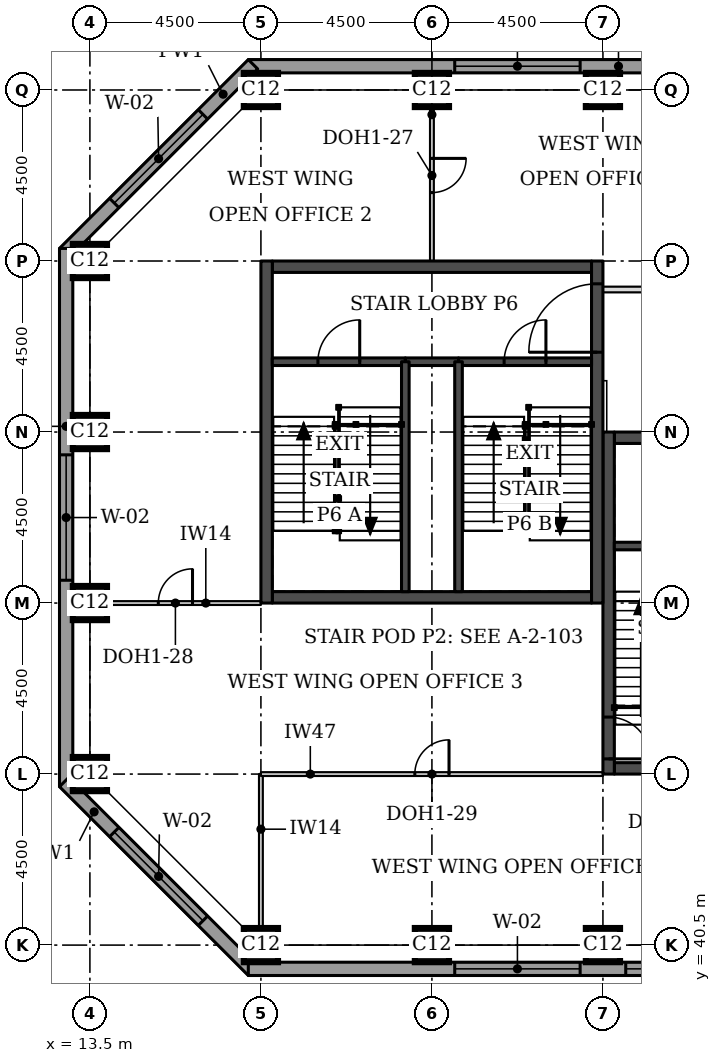
"""IFC4 building model, lengths in metres.
Left out: names, types, materials, properties, quantities, classifications, styles, units other than length and angle.
Written with IfcOpenShell. Run it as: python <this file> out.ifc"""

import sys

from ifc_helpers import new_model, si_unit, direction, frame, frame_2d, origin, origin_2d, place, context, subcontext, project, spatial, rectangle, extrude, element, fill, save


model = new_model("IFC4")
c1 = context("Model", 3, precision=1e-05, world=origin(), true_north=direction((0.0, 1.0)))
c2 = subcontext(c1, "Body", "Model", "MODEL_VIEW")
j1 = project(units=[si_unit("LENGTHUNIT", "METRE"), si_unit("PLANEANGLEUNIT", "RADIAN")], contexts=[c1])
p1 = place(None, origin())
s1 = spatial("IfcSite", under=j1, at=p1, CompositionType="ELEMENT")
p2 = place(p1, origin())
s2 = spatial("IfcBuilding", under=s1, at=p2, CompositionType="ELEMENT")
p3 = place(p2, frame((0.0, 0.0, 147.7)))
s3 = spatial("IfcBuildingStorey", under=s2, at=p3, CompositionType="ELEMENT", Elevation=147.7)
for number, where, z_axis, x_axis in (
    (1, (18.0, 40.5, 0.0), (0.0, 0.0, 1.0), (1.0, 0.0, 0.0)),
    (2, (22.5, 40.5, 0.0), (0.0, 0.0, 1.0), (1.0, 0.0, 0.0)),
    (3, (27.0, 40.5, 0.0), (0.0, 0.0, 1.0), (1.0, 0.0, 0.0)),
    (4, (13.5, 45.0, 0.0), (0.0, 0.0, 1.0), (1.0, 0.0, 0.0)),
    (5, (13.5, 49.5, 0.0), (0.0, 0.0, 1.0), (1.0, 0.0, 0.0)),
    (6, (13.5, 54.0, 0.0), (0.0, 0.0, 1.0), (1.0, 0.0, 0.0)),
    (7, (13.5, 58.5, 0.0), (0.0, 0.0, 1.0), (1.0, 0.0, 0.0)),
    (8, (18.0, 63.0, 0.0), (0.0, 0.0, 1.0), (1.0, 0.0, 0.0)),
    (9, (22.5, 63.0, 0.0), (0.0, 0.0, 1.0), (1.0, 0.0, 0.0)),
    (10, (27.0, 63.0, 0.0), (0.0, 0.0, 1.0), (1.0, 0.0, 0.0)),
):
    element("IfcColumn", number, at=place(p3, frame(where, z_axis=z_axis, x_axis=x_axis)), inside=s3, PredefinedType="COLUMN", context=c2, shape_type="SweptSolid", body=[
        extrude(rectangle(XDim=0.9, YDim=0.9, at=origin_2d()), origin(), (0.0, 0.0, 1.0), 3.7),
    ])
p4 = place(p3, frame((27.3, 45.15, 0.0), z_axis=(0.0, 0.0, 1.0), x_axis=(1.0, 0.0, 0.0)))
e11 = element("IfcWall", 11, at=p4, inside=s3, PredefinedType="SHEAR", context=c2, shape_type="SweptSolid", body=[
    extrude(rectangle(XDim=8.4, YDim=0.3, at=frame_2d((4.2, 0.0))), origin(), (0.0, 0.0, 1.0), 3.7),
])
p5 = place(p4, frame((5.2, 0.0, 0.0)))
e12 = element("IfcOpeningElement", 12, at=p5, cuts=e11, PredefinedType="OPENING", context=c2, shape_type="SweptSolid", body=[
    extrude(rectangle(XDim=1.0, YDim=2.1, at=frame_2d((0.5, 1.05))), frame((0.0, 0.16, 0.0), z_axis=(0.0, -1.0, 0.0), x_axis=(1.0, 0.0, 0.0)), (0.0, 0.0, 1.0), 0.32),
])
p6 = place(p3, frame((27.3, 53.85, 0.0), z_axis=(0.0, 0.0, 1.0), x_axis=(1.0, 0.0, 0.0)))
e13 = element("IfcWall", 13, at=p6, inside=s3, PredefinedType="SHEAR", context=c2, shape_type="SweptSolid", body=[
    extrude(rectangle(XDim=8.4, YDim=0.3, at=frame_2d((4.2, 0.0))), origin(), (0.0, 0.0, 1.0), 3.7),
])
p7 = place(p6, frame((6.4, 0.0, 0.0)))
e14 = element("IfcOpeningElement", 14, at=p7, cuts=e13, PredefinedType="OPENING", context=c2, shape_type="SweptSolid", body=[
    extrude(rectangle(XDim=1.1, YDim=2.1, at=frame_2d((0.55, 1.05))), frame((0.0, 0.16, 0.0), z_axis=(0.0, -1.0, 0.0), x_axis=(1.0, 0.0, 0.0)), (0.0, 0.0, 1.0), 0.32),
])
p8 = place(p3, frame((27.15, 45.0, 0.0), z_axis=(0.0, 0.0, 1.0), x_axis=(0.0, 1.0, 0.0)))
e15 = element("IfcWall", 15, at=p8, inside=s3, PredefinedType="SHEAR", context=c2, shape_type="SweptSolid", body=[
    extrude(rectangle(XDim=9.0, YDim=0.3, at=frame_2d((4.5, 0.0))), origin(), (0.0, 0.0, 1.0), 3.7),
])
p9 = place(p8, frame((0.4, 0.0, 0.0)))
e16 = element("IfcOpeningElement", 16, at=p9, cuts=e15, PredefinedType="OPENING", context=c2, shape_type="SweptSolid", body=[
    extrude(rectangle(XDim=1.1, YDim=2.1, at=frame_2d((0.55, 1.05))), frame((0.0, 0.16, 0.0), z_axis=(0.0, -1.0, 0.0), x_axis=(1.0, 0.0, 0.0)), (0.0, 0.0, 1.0), 0.32),
])
for number, where, z_axis, x_axis in (
    (17, (18.3, 49.65, 0.0), (0.0, 0.0, 1.0), (1.0, 0.0, 0.0)),
    (18, (18.3, 58.35, 0.0), (0.0, 0.0, 1.0), (1.0, 0.0, 0.0)),
):
    element("IfcWall", number, at=place(p3, frame(where, z_axis=z_axis, x_axis=x_axis)), inside=s3, PredefinedType="SHEAR", context=c2, shape_type="SweptSolid", body=[
        extrude(rectangle(XDim=8.4, YDim=0.3, at=frame_2d((4.2, 0.0))), origin(), (0.0, 0.0, 1.0), 3.7),
    ])
p10 = place(p3, frame((18.15, 49.5, 0.0), z_axis=(0.0, 0.0, 1.0), x_axis=(0.0, 1.0, 0.0)))
e19 = element("IfcWall", 19, at=p10, inside=s3, PredefinedType="SHEAR", context=c2, shape_type="SweptSolid", body=[
    extrude(rectangle(XDim=9.0, YDim=0.3, at=frame_2d((4.5, 0.0))), origin(), (0.0, 0.0, 1.0), 3.7),
])
p11 = place(p3, frame((26.85, 49.5, 0.0), z_axis=(0.0, 0.0, 1.0), x_axis=(0.0, 1.0, 0.0)))
e20 = element("IfcWall", 20, at=p11, inside=s3, PredefinedType="SHEAR", context=c2, shape_type="SweptSolid", body=[
    extrude(rectangle(XDim=9.0, YDim=0.3, at=frame_2d((4.5, 0.0))), origin(), (0.0, 0.0, 1.0), 3.7),
])
p12 = place(p11, frame((6.6, 0.0, 0.0)))
e21 = element("IfcOpeningElement", 21, at=p12, cuts=e20, PredefinedType="OPENING", context=c2, shape_type="SweptSolid", body=[
    extrude(rectangle(XDim=1.8, YDim=2.1, at=frame_2d((0.9, 1.05))), frame((0.0, 0.16, 0.0), z_axis=(0.0, -1.0, 0.0), x_axis=(1.0, 0.0, 0.0)), (0.0, 0.0, 1.0), 0.32),
])
p13 = place(p3, frame((35.55, 63.625, 0.0), z_axis=(0.0, 0.0, 1.0), x_axis=(-1.0, 0.0, 0.0)))
e22 = element("IfcWall", 22, at=p13, inside=s3, PredefinedType="STANDARD", context=c2, shape_type="SweptSolid", body=[
    extrude(rectangle(XDim=17.881, YDim=0.35, at=frame_2d((8.941, 0.0))), origin(), (0.0, 0.0, 1.0), 3.525),
])
p14 = place(p13, frame((0.5, 0.0, 0.9)))
e23 = element("IfcOpeningElement", 23, at=p14, cuts=e22, PredefinedType="OPENING", context=c2, shape_type="SweptSolid", body=[
    extrude(rectangle(XDim=3.3, YDim=1.9, at=frame_2d((1.65, 0.95))), frame((0.0, 0.185, 0.0), z_axis=(0.0, -1.0, 0.0), x_axis=(1.0, 0.0, 0.0)), (0.0, 0.0, 1.0), 0.37),
])
p15 = place(p13, frame((9.15, 0.0, 0.9)))
e24 = element("IfcOpeningElement", 24, at=p15, cuts=e22, PredefinedType="OPENING", context=c2, shape_type="SweptSolid", body=[
    extrude(rectangle(XDim=3.3, YDim=1.9, at=frame_2d((1.65, 0.95))), frame((0.0, 0.185, 0.0), z_axis=(0.0, -1.0, 0.0), x_axis=(1.0, 0.0, 0.0)), (0.0, 0.0, 1.0), 0.37),
])
p16 = place(p3, frame((17.792, 63.676, 0.0), z_axis=(0.0, 0.0, 1.0), x_axis=(-0.707106781187, -0.707106781187, 0.0)))
e25 = element("IfcWall", 25, at=p16, inside=s3, PredefinedType="STANDARD", context=c2, shape_type="SweptSolid", body=[
    extrude(rectangle(XDim=7.027, YDim=0.35, at=frame_2d((3.513, 0.0))), origin(), (0.0, 0.0, 1.0), 3.525),
])
p17 = place(p16, frame((1.863, 0.0, 0.9)))
e26 = element("IfcOpeningElement", 26, at=p17, cuts=e25, PredefinedType="OPENING", context=c2, shape_type="SweptSolid", body=[
    extrude(rectangle(XDim=3.3, YDim=1.9, at=frame_2d((1.65, 0.95))), frame((0.0, 0.185, 0.0), z_axis=(0.0, -1.0, 0.0), x_axis=(1.0, 0.0, 0.0)), (0.0, 0.0, 1.0), 0.37),
])
p18 = place(p3, frame((12.875, 58.831, 0.0), z_axis=(0.0, 0.0, 1.0), x_axis=(0.0, -1.0, 0.0)))
e27 = element("IfcWall", 27, at=p18, inside=s3, PredefinedType="STANDARD", context=c2, shape_type="SweptSolid", body=[
    extrude(rectangle(XDim=14.163, YDim=0.35, at=frame_2d((7.081, 0.0))), origin(), (0.0, 0.0, 1.0), 3.525),
])
p19 = place(p18, frame((5.431, 0.0, 0.9)))
e28 = element("IfcOpeningElement", 28, at=p19, cuts=e27, PredefinedType="OPENING", context=c2, shape_type="SweptSolid", body=[
    extrude(rectangle(XDim=3.3, YDim=1.9, at=frame_2d((1.65, 0.95))), frame((0.0, 0.185, 0.0), z_axis=(0.0, -1.0, 0.0), x_axis=(1.0, 0.0, 0.0)), (0.0, 0.0, 1.0), 0.37),
])
p20 = place(p3, frame((12.824, 44.792, 0.0), z_axis=(0.0, 0.0, 1.0), x_axis=(0.707106781187, -0.707106781187, 0.0)))
e29 = element("IfcWall", 29, at=p20, inside=s3, PredefinedType="STANDARD", context=c2, shape_type="SweptSolid", body=[
    extrude(rectangle(XDim=7.027, YDim=0.35, at=frame_2d((3.513, 0.0))), origin(), (0.0, 0.0, 1.0), 3.525),
])
p21 = place(p20, frame((1.863, 0.0, 0.9)))
e30 = element("IfcOpeningElement", 30, at=p21, cuts=e29, PredefinedType="OPENING", context=c2, shape_type="SweptSolid", body=[
    extrude(rectangle(XDim=3.3, YDim=1.9, at=frame_2d((1.65, 0.95))), frame((0.0, 0.185, 0.0), z_axis=(0.0, -1.0, 0.0), x_axis=(1.0, 0.0, 0.0)), (0.0, 0.0, 1.0), 0.37),
])
p22 = place(p3, frame((17.669, 39.875, 0.0), z_axis=(0.0, 0.0, 1.0), x_axis=(1.0, 0.0, 0.0)))
e31 = element("IfcWall", 31, at=p22, inside=s3, PredefinedType="STANDARD", context=c2, shape_type="SweptSolid", body=[
    extrude(rectangle(XDim=18.331, YDim=0.35, at=frame_2d((9.166, 0.0))), origin(), (0.0, 0.0, 1.0), 3.525),
])
p23 = place(p22, frame((5.431, 0.0, 0.9)))
e32 = element("IfcOpeningElement", 32, at=p23, cuts=e31, PredefinedType="OPENING", context=c2, shape_type="SweptSolid", body=[
    extrude(rectangle(XDim=3.3, YDim=1.9, at=frame_2d((1.65, 0.95))), frame((0.0, 0.185, 0.0), z_axis=(0.0, -1.0, 0.0), x_axis=(1.0, 0.0, 0.0)), (0.0, 0.0, 1.0), 0.37),
])
p24 = place(p22, frame((9.931, 0.0, 0.9)))
e33 = element("IfcOpeningElement", 33, at=p24, cuts=e31, PredefinedType="OPENING", context=c2, shape_type="SweptSolid", body=[
    extrude(rectangle(XDim=3.3, YDim=1.9, at=frame_2d((1.65, 0.95))), frame((0.0, 0.185, 0.0), z_axis=(0.0, -1.0, 0.0), x_axis=(1.0, 0.0, 0.0)), (0.0, 0.0, 1.0), 0.37),
])
p25 = place(p3, frame((22.5, 63.0, 0.0), z_axis=(0.0, 0.0, 1.0), x_axis=(0.0, -1.0, 0.0)))
e34 = element("IfcWall", 34, at=p25, inside=s3, PredefinedType="PARTITIONING", context=c2, shape_type="SweptSolid", body=[
    extrude(rectangle(XDim=4.5, YDim=0.1, at=frame_2d((2.25, 0.0))), origin(), (0.0, 0.0, 1.0), 3.55),
])
p26 = place(p25, frame((1.8, 0.0, 0.0)))
e35 = element("IfcOpeningElement", 35, at=p26, cuts=e34, PredefinedType="OPENING", context=c2, shape_type="SweptSolid", body=[
    extrude(rectangle(XDim=0.9, YDim=2.1, at=frame_2d((0.45, 1.05))), frame((0.0, 0.06, 0.0), z_axis=(0.0, -1.0, 0.0), x_axis=(1.0, 0.0, 0.0)), (0.0, 0.0, 1.0), 0.12),
])
p27 = place(p3, frame((13.5, 49.5, 0.0), z_axis=(0.0, 0.0, 1.0), x_axis=(1.0, 0.0, 0.0)))
e36 = element("IfcWall", 36, at=p27, inside=s3, PredefinedType="PARTITIONING", context=c2, shape_type="SweptSolid", body=[
    extrude(rectangle(XDim=4.5, YDim=0.1, at=frame_2d((2.25, 0.0))), origin(), (0.0, 0.0, 1.0), 3.55),
])
p28 = place(p27, frame((1.8, 0.0, 0.0)))
e37 = element("IfcOpeningElement", 37, at=p28, cuts=e36, PredefinedType="OPENING", context=c2, shape_type="SweptSolid", body=[
    extrude(rectangle(XDim=0.9, YDim=2.1, at=frame_2d((0.45, 1.05))), frame((0.0, 0.06, 0.0), z_axis=(0.0, -1.0, 0.0), x_axis=(1.0, 0.0, 0.0)), (0.0, 0.0, 1.0), 0.12),
])
p29 = place(p3, frame((18.0, 40.5, 0.0), z_axis=(0.0, 0.0, 1.0), x_axis=(0.0, 1.0, 0.0)))
e38 = element("IfcWall", 38, at=p29, inside=s3, PredefinedType="PARTITIONING", context=c2, shape_type="SweptSolid", body=[
    extrude(rectangle(XDim=4.5, YDim=0.1, at=frame_2d((2.25, 0.0))), origin(), (0.0, 0.0, 1.0), 3.55),
])
p30 = place(p3, frame((18.0, 45.0, 0.0), z_axis=(0.0, 0.0, 1.0), x_axis=(1.0, 0.0, 0.0)))
e39 = element("IfcWall", 39, at=p30, inside=s3, PredefinedType="PARTITIONING", context=c2, shape_type="SweptSolid", body=[
    extrude(rectangle(XDim=9.0, YDim=0.1, at=frame_2d((4.5, 0.0))), origin(), (0.0, 0.0, 1.0), 2.55),
])
p31 = place(p30, frame((4.05, 0.0, 0.0)))
e40 = element("IfcOpeningElement", 40, at=p31, cuts=e39, PredefinedType="OPENING", context=c2, shape_type="SweptSolid", body=[
    extrude(rectangle(XDim=0.9, YDim=2.1, at=frame_2d((0.45, 1.05))), frame((0.0, 0.06, 0.0), z_axis=(0.0, -1.0, 0.0), x_axis=(1.0, 0.0, 0.0)), (0.0, 0.0, 1.0), 0.12),
])
p32 = place(p3, frame((27.0, 57.75, 0.0), z_axis=(0.0, 0.0, 1.0), x_axis=(1.0, 0.0, 0.0)))
e41 = element("IfcWall", 41, at=p32, inside=s3, PredefinedType="PARTITIONING", context=c2, shape_type="SweptSolid", body=[
    extrude(rectangle(XDim=2.4, YDim=0.15, at=frame_2d((1.2, 0.0))), origin(), (0.0, 0.0, 1.0), 3.55),
])
p33 = place(p3, frame((27.3, 51.0, 0.0), z_axis=(0.0, 0.0, 1.0), x_axis=(1.0, 0.0, 0.0)))
e42 = element("IfcWall", 42, at=p33, inside=s3, PredefinedType="SOLIDWALL", context=c2, shape_type="SweptSolid", body=[
    extrude(rectangle(XDim=3.0, YDim=0.2, at=frame_2d((1.5, 0.0))), origin(), (0.0, 0.0, 1.0), 3.55),
])
p34 = place(p3, frame((21.8, 55.85, 0.0), z_axis=(0.0, 0.0, 1.0), x_axis=(1.0, 0.0, 0.0)))
e43 = element("IfcWall", 43, at=p34, inside=s3, PredefinedType="SOLIDWALL", context=c2, shape_type="SweptSolid", body=[
    extrude(rectangle(XDim=1.4, YDim=0.2, at=frame_2d((0.7, 0.0))), origin(), (0.0, 0.0, 1.0), 3.55),
])
p35 = place(p3, frame((18.3, 55.85, 0.0), z_axis=(0.0, 0.0, 1.0), x_axis=(1.0, 0.0, 0.0)))
e44 = element("IfcWall", 44, at=p35, inside=s3, PredefinedType="SOLIDWALL", context=c2, shape_type="SweptSolid", body=[
    extrude(rectangle(XDim=3.5, YDim=0.2, at=frame_2d((1.75, 0.0))), origin(), (0.0, 0.0, 1.0), 3.55),
])
p36 = place(p35, frame((1.2, 0.0, 0.0)))
e45 = element("IfcOpeningElement", 45, at=p36, cuts=e44, PredefinedType="OPENING", context=c2, shape_type="SweptSolid", body=[
    extrude(rectangle(XDim=1.1, YDim=2.1, at=frame_2d((0.55, 1.05))), frame((0.0, 0.11, 0.0), z_axis=(0.0, -1.0, 0.0), x_axis=(1.0, 0.0, 0.0)), (0.0, 0.0, 1.0), 0.22),
])
p37 = place(p3, frame((23.2, 55.85, 0.0), z_axis=(0.0, 0.0, 1.0), x_axis=(1.0, 0.0, 0.0)))
e46 = element("IfcWall", 46, at=p37, inside=s3, PredefinedType="SOLIDWALL", context=c2, shape_type="SweptSolid", body=[
    extrude(rectangle(XDim=3.5, YDim=0.2, at=frame_2d((1.75, 0.0))), origin(), (0.0, 0.0, 1.0), 3.55),
])
p38 = place(p37, frame((1.2, 0.0, 0.0)))
e47 = element("IfcOpeningElement", 47, at=p38, cuts=e46, PredefinedType="OPENING", context=c2, shape_type="SweptSolid", body=[
    extrude(rectangle(XDim=1.1, YDim=2.1, at=frame_2d((0.55, 1.05))), frame((0.0, 0.11, 0.0), z_axis=(0.0, -1.0, 0.0), x_axis=(1.0, 0.0, 0.0)), (0.0, 0.0, 1.0), 0.22),
])
for number, where, z_axis, x_axis in (
    (48, (21.8, 49.8, 0.0), (0.0, 0.0, 1.0), (0.0, 1.0, 0.0)),
    (49, (23.2, 49.8, 0.0), (0.0, 0.0, 1.0), (0.0, 1.0, 0.0)),
):
    element("IfcWall", number, at=place(p3, frame(where, z_axis=z_axis, x_axis=x_axis)), inside=s3, PredefinedType="SOLIDWALL", context=c2, shape_type="SweptSolid", body=[
        extrude(rectangle(XDim=6.05, YDim=0.2, at=frame_2d((3.025, 0.0))), origin(), (0.0, 0.0, 1.0), 3.55),
    ])
p39 = place(p15, origin())
e50 = element("IfcWindow", 50, at=p39, inside=s3, PartitioningType="SINGLE_PANEL", PredefinedType="WINDOW", context=c2, shape_type="SweptSolid", body=[
    extrude(rectangle(XDim=3.3, YDim=1.9, at=frame_2d((1.65, 0.95))), frame((0.0, 0.085, 0.0), z_axis=(0.0, -1.0, 0.0), x_axis=(1.0, 0.0, 0.0)), (0.0, 0.0, 1.0), 0.06),
])
fill(e24, e50)
p40 = place(p17, origin())
e51 = element("IfcWindow", 51, at=p40, inside=s3, PartitioningType="SINGLE_PANEL", PredefinedType="WINDOW", context=c2, shape_type="SweptSolid", body=[
    extrude(rectangle(XDim=3.3, YDim=1.9, at=frame_2d((1.65, 0.95))), frame((0.0, 0.085, 0.0), z_axis=(0.0, -1.0, 0.0), x_axis=(1.0, 0.0, 0.0)), (0.0, 0.0, 1.0), 0.06),
])
fill(e26, e51)
p41 = place(p19, origin())
e52 = element("IfcWindow", 52, at=p41, inside=s3, PartitioningType="SINGLE_PANEL", PredefinedType="WINDOW", context=c2, shape_type="SweptSolid", body=[
    extrude(rectangle(XDim=3.3, YDim=1.9, at=frame_2d((1.65, 0.95))), frame((0.0, 0.085, 0.0), z_axis=(0.0, -1.0, 0.0), x_axis=(1.0, 0.0, 0.0)), (0.0, 0.0, 1.0), 0.06),
])
fill(e28, e52)
p42 = place(p21, origin())
e53 = element("IfcWindow", 53, at=p42, inside=s3, PartitioningType="SINGLE_PANEL", PredefinedType="WINDOW", context=c2, shape_type="SweptSolid", body=[
    extrude(rectangle(XDim=3.3, YDim=1.9, at=frame_2d((1.65, 0.95))), frame((0.0, 0.085, 0.0), z_axis=(0.0, -1.0, 0.0), x_axis=(1.0, 0.0, 0.0)), (0.0, 0.0, 1.0), 0.06),
])
fill(e30, e53)
p43 = place(p23, origin())
e54 = element("IfcWindow", 54, at=p43, inside=s3, PartitioningType="SINGLE_PANEL", PredefinedType="WINDOW", context=c2, shape_type="SweptSolid", body=[
    extrude(rectangle(XDim=3.3, YDim=1.9, at=frame_2d((1.65, 0.95))), frame((0.0, 0.085, 0.0), z_axis=(0.0, -1.0, 0.0), x_axis=(1.0, 0.0, 0.0)), (0.0, 0.0, 1.0), 0.06),
])
fill(e32, e54)
p44 = place(p24, origin())
e55 = element("IfcWindow", 55, at=p44, inside=s3, PartitioningType="SINGLE_PANEL", PredefinedType="WINDOW", context=c2, shape_type="SweptSolid", body=[
    extrude(rectangle(XDim=3.3, YDim=1.9, at=frame_2d((1.65, 0.95))), frame((0.0, 0.085, 0.0), z_axis=(0.0, -1.0, 0.0), x_axis=(1.0, 0.0, 0.0)), (0.0, 0.0, 1.0), 0.06),
])
fill(e33, e55)
p45 = place(p26, origin())
e56 = element("IfcDoor", 56, at=p45, inside=s3, OperationType="SINGLE_SWING_LEFT", PredefinedType="DOOR", context=c2, shape_type="SweptSolid", body=[
    extrude(rectangle(XDim=0.9, YDim=2.1, at=frame_2d((0.45, 1.05))), frame((0.0, 0.025, 0.0), z_axis=(0.0, -1.0, 0.0), x_axis=(1.0, 0.0, 0.0)), (0.0, 0.0, 1.0), 0.05),
])
fill(e35, e56)
p46 = place(p28, origin())
e57 = element("IfcDoor", 57, at=p46, inside=s3, OperationType="SINGLE_SWING_RIGHT", PredefinedType="DOOR", context=c2, shape_type="SweptSolid", body=[
    extrude(rectangle(XDim=0.9, YDim=2.1, at=frame_2d((0.45, 1.05))), frame((0.0, 0.025, 0.0), z_axis=(0.0, -1.0, 0.0), x_axis=(1.0, 0.0, 0.0)), (0.0, 0.0, 1.0), 0.05),
])
fill(e37, e57)
p47 = place(p31, origin())
e58 = element("IfcDoor", 58, at=p47, inside=s3, OperationType="SINGLE_SWING_RIGHT", PredefinedType="DOOR", context=c2, shape_type="SweptSolid", body=[
    extrude(rectangle(XDim=0.9, YDim=2.1, at=frame_2d((0.45, 1.05))), frame((0.0, 0.025, 0.0), z_axis=(0.0, -1.0, 0.0), x_axis=(1.0, 0.0, 0.0)), (0.0, 0.0, 1.0), 0.05),
])
fill(e40, e58)
p48 = place(p9, frame((1.1, 0.0, 0.0), z_axis=(0.0, 0.0, 1.0), x_axis=(-1.0, 0.0, 0.0)))
e59 = element("IfcDoor", 59, at=p48, inside=s3, OperationType="SINGLE_SWING_RIGHT", PredefinedType="DOOR", context=c2, shape_type="SweptSolid", body=[
    extrude(rectangle(XDim=1.1, YDim=2.1, at=frame_2d((0.55, 1.05))), frame((0.0, 0.025, 0.0), z_axis=(0.0, -1.0, 0.0), x_axis=(1.0, 0.0, 0.0)), (0.0, 0.0, 1.0), 0.05),
])
fill(e16, e59)
p49 = place(p36, origin())
e60 = element("IfcDoor", 60, at=p49, inside=s3, OperationType="SINGLE_SWING_RIGHT", PredefinedType="DOOR", context=c2, shape_type="SweptSolid", body=[
    extrude(rectangle(XDim=1.1, YDim=2.1, at=frame_2d((0.55, 1.05))), frame((0.0, 0.025, 0.0), z_axis=(0.0, -1.0, 0.0), x_axis=(1.0, 0.0, 0.0)), (0.0, 0.0, 1.0), 0.05),
])
fill(e45, e60)
p50 = place(p38, origin())
e61 = element("IfcDoor", 61, at=p50, inside=s3, OperationType="SINGLE_SWING_RIGHT", PredefinedType="DOOR", context=c2, shape_type="SweptSolid", body=[
    extrude(rectangle(XDim=1.1, YDim=2.1, at=frame_2d((0.55, 1.05))), frame((0.0, 0.025, 0.0), z_axis=(0.0, -1.0, 0.0), x_axis=(1.0, 0.0, 0.0)), (0.0, 0.0, 1.0), 0.05),
])
fill(e47, e61)
p51 = place(p12, origin())
e62 = element("IfcDoor", 62, at=p51, inside=s3, OperationType="SINGLE_SWING_LEFT", PredefinedType="DOOR", context=c2, shape_type="SweptSolid", body=[
    extrude(rectangle(XDim=1.8, YDim=2.1, at=frame_2d((0.9, 1.05))), frame((0.0, 0.025, 0.0), z_axis=(0.0, -1.0, 0.0), x_axis=(1.0, 0.0, 0.0)), (0.0, 0.0, 1.0), 0.05),
])
fill(e21, e62)
save(model, sys.argv[1])
